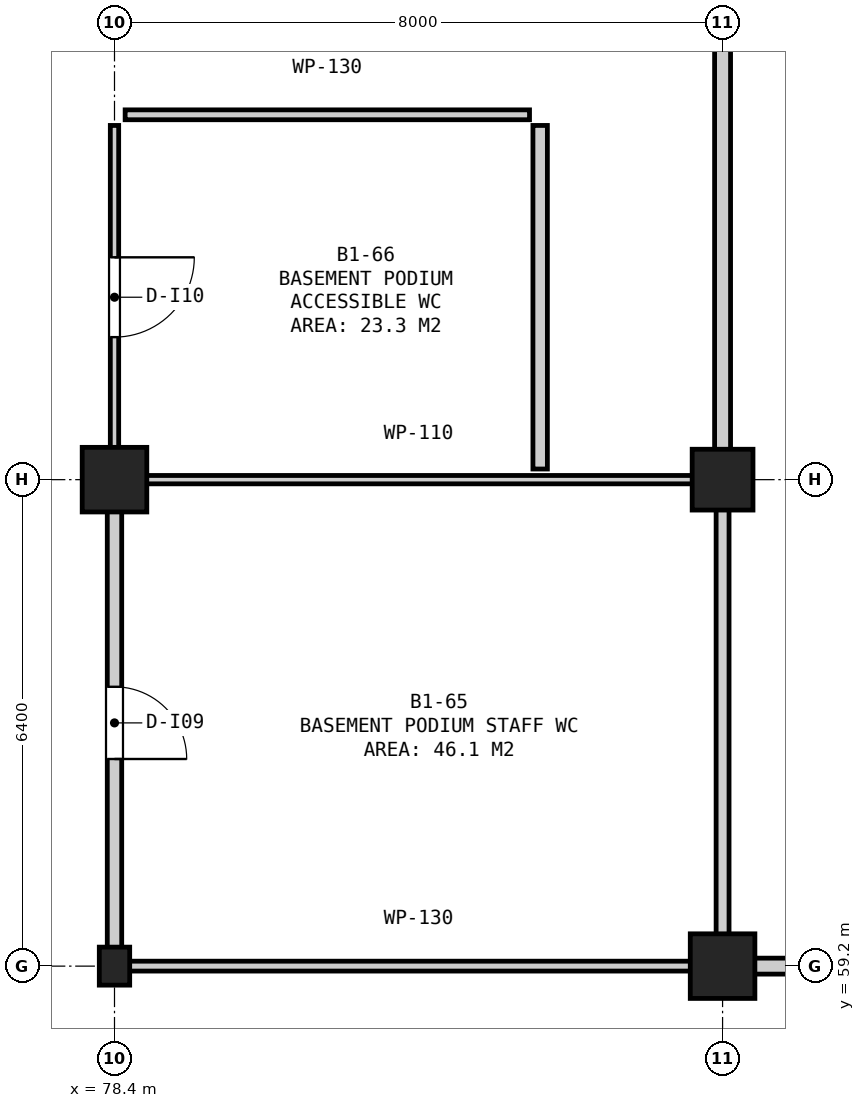
"""IFC4 building model, lengths in metres.
Left out: names, types, materials, properties, quantities, classifications, styles, units other than length and angle.
Written with IfcOpenShell. Run it as: python <this file> out.ifc"""

import sys

from ifc_helpers import new_model, si_unit, direction, frame, frame_2d, origin, origin_2d, place, context, subcontext, project, spatial, rectangle, extrude, element, fill, save


model = new_model("IFC4")
c1 = context("Model", 3, precision=1e-05, world=origin(), true_north=direction((0.0, 1.0)))
c2 = subcontext(c1, "Body", "Model", "MODEL_VIEW")
j1 = project(units=[si_unit("LENGTHUNIT", "METRE"), si_unit("PLANEANGLEUNIT", "RADIAN")], contexts=[c1])
p1 = place(None, origin())
s1 = spatial("IfcSite", under=j1, at=p1, CompositionType="ELEMENT")
p2 = place(p1, origin())
s2 = spatial("IfcBuilding", under=s1, at=p2, CompositionType="ELEMENT")
p3 = place(p2, frame((0.0, 0.0, -4.5)))
s3 = spatial("IfcBuildingStorey", under=s2, at=p3, CompositionType="ELEMENT", Elevation=-4.5)
p4 = place(p3, frame((78.4, 59.2, 0.0), z_axis=(0.0, 0.0, 1.0), x_axis=(1.0, 0.0, 0.0)))
e1 = element("IfcColumn", 1, at=p4, inside=s3, PredefinedType="COLUMN", context=c2, shape_type="SweptSolid", body=[
    extrude(rectangle(XDim=0.4, YDim=0.5, at=origin_2d()), origin(), (0.0, 0.0, 1.0), 4.5),
])
for number, where, z_axis, x_axis in (
    (2, (78.4, 65.6, 0.0), (0.0, 0.0, 1.0), (1.0, 0.0, 0.0)),
    (3, (86.4, 59.2, 0.0), (0.0, 0.0, 1.0), (1.0, 0.0, 0.0)),
):
    element("IfcColumn", number, at=place(p3, frame(where, z_axis=z_axis, x_axis=x_axis)), inside=s3, PredefinedType="COLUMN", context=c2, shape_type="SweptSolid", body=[
        extrude(rectangle(XDim=0.85, YDim=0.85, at=origin_2d()), origin(), (0.0, 0.0, 1.0), 4.5),
    ])
p5 = place(p3, frame((86.4, 65.6, 0.0), z_axis=(0.0, 0.0, 1.0), x_axis=(1.0, 0.0, 0.0)))
e4 = element("IfcColumn", 4, at=p5, inside=s3, PredefinedType="COLUMN", context=c2, shape_type="SweptSolid", body=[
    extrude(rectangle(XDim=0.8, YDim=0.8, at=origin_2d()), origin(), (0.0, 0.0, 1.0), 4.5),
])
p6 = place(p3, frame((78.54, 59.2, 0.0), z_axis=(0.0, 0.0, 1.0), x_axis=(1.0, 0.0, 0.0)))
e5 = element("IfcWall", 5, at=p6, inside=s3, PredefinedType="PARTITIONING", context=c2, shape_type="SweptSolid", body=[
    extrude(rectangle(XDim=7.72, YDim=0.13, at=frame_2d((3.86, 0.0))), origin(), (0.0, 0.0, 1.0), 3.475),
])
p7 = place(p3, frame((78.54, 65.6, 0.0), z_axis=(0.0, 0.0, 1.0), x_axis=(1.0, 0.0, 0.0)))
e6 = element("IfcWall", 6, at=p7, inside=s3, PredefinedType="PARTITIONING", context=c2, shape_type="SweptSolid", body=[
    extrude(rectangle(XDim=7.72, YDim=0.11, at=frame_2d((3.86, 0.0))), origin(), (0.0, 0.0, 1.0), 3.275),
])
p8 = place(p3, frame((78.4, 59.34, 0.0), z_axis=(0.0, 0.0, 1.0), x_axis=(0.0, 1.0, 0.0)))
e7 = element("IfcWall", 7, at=p8, inside=s3, PredefinedType="PARTITIONING", context=c2, shape_type="SweptSolid", body=[
    extrude(rectangle(XDim=6.12, YDim=0.19, at=frame_2d((3.06, 0.0))), origin(), (0.0, 0.0, 1.0), 3.375),
])
p9 = place(p8, frame((2.585, 0.0, 0.0)))
e8 = element("IfcOpeningElement", 8, at=p9, cuts=e7, PredefinedType="OPENING", context=c2, shape_type="SweptSolid", body=[
    extrude(rectangle(XDim=0.95, YDim=2.15, at=frame_2d((0.475, 1.075))), frame((0.0, 0.107, 0.0), z_axis=(0.0, -1.0, 0.0), x_axis=(1.0, 0.0, 0.0)), (0.0, 0.0, 1.0), 0.214),
])
p10 = place(p3, frame((86.4, 59.34, 0.0), z_axis=(0.0, 0.0, 1.0), x_axis=(0.0, 1.0, 0.0)))
e9 = element("IfcWall", 9, at=p10, inside=s3, PredefinedType="PARTITIONING", context=c2, shape_type="SweptSolid", body=[
    extrude(rectangle(XDim=6.12, YDim=0.17, at=frame_2d((3.06, 0.0))), origin(), (0.0, 0.0, 1.0), 3.225),
])
p11 = place(p3, frame((78.54, 70.4, 0.0), z_axis=(0.0, 0.0, 1.0), x_axis=(1.0, 0.0, 0.0)))
e10 = element("IfcWall", 10, at=p11, inside=s3, PredefinedType="PARTITIONING", context=c2, shape_type="SweptSolid", body=[
    extrude(rectangle(XDim=5.32, YDim=0.13, at=frame_2d((2.66, 0.0))), origin(), (0.0, 0.0, 1.0), 4.08),
])
p12 = place(p3, frame((78.4, 65.74, 0.0), z_axis=(0.0, 0.0, 1.0), x_axis=(0.0, 1.0, 0.0)))
e11 = element("IfcWall", 11, at=p12, inside=s3, PredefinedType="PARTITIONING", context=c2, shape_type="SweptSolid", body=[
    extrude(rectangle(XDim=4.52, YDim=0.11, at=frame_2d((2.26, 0.0))), origin(), (0.0, 0.0, 1.0), 3.425),
])
p13 = place(p12, frame((1.735, 0.0, 0.0)))
e12 = element("IfcOpeningElement", 12, at=p13, cuts=e11, PredefinedType="OPENING", context=c2, shape_type="SweptSolid", body=[
    extrude(rectangle(XDim=1.05, YDim=2.15, at=frame_2d((0.525, 1.075))), frame((0.0, 0.067, 0.0), z_axis=(0.0, -1.0, 0.0), x_axis=(1.0, 0.0, 0.0)), (0.0, 0.0, 1.0), 0.134),
])
p14 = place(p3, frame((84.0, 65.74, 0.0), z_axis=(0.0, 0.0, 1.0), x_axis=(0.0, 1.0, 0.0)))
e13 = element("IfcWall", 13, at=p14, inside=s3, PredefinedType="PARTITIONING", context=c2, shape_type="SweptSolid", body=[
    extrude(rectangle(XDim=4.52, YDim=0.19, at=frame_2d((2.26, 0.0))), origin(), (0.0, 0.0, 1.0), 4.08),
])
p15 = place(p3, frame((86.54, 59.2, 0.0), z_axis=(0.0, 0.0, 1.0), x_axis=(1.0, 0.0, 0.0)))
e14 = element("IfcWall", 14, at=p15, inside=s3, PredefinedType="SOLIDWALL", context=c2, shape_type="SweptSolid", body=[
    extrude(rectangle(XDim=23.72, YDim=0.21, at=frame_2d((11.86, 0.0))), origin(), (0.0, 0.0, 1.0), 2.925),
])
p16 = place(p15, frame((7.16, 0.0, 0.0)))
e15 = element("IfcOpeningElement", 15, at=p16, cuts=e14, PredefinedType="OPENING", context=c2, shape_type="SweptSolid", body=[
    extrude(rectangle(XDim=1.4, YDim=2.2, at=frame_2d((0.7, 1.1))), frame((0.0, 0.117, 0.0), z_axis=(0.0, -1.0, 0.0), x_axis=(1.0, 0.0, 0.0)), (0.0, 0.0, 1.0), 0.234),
])
p17 = place(p3, frame((86.4, 65.6, 0.0), z_axis=(0.0, 0.0, 1.0), x_axis=(0.0, 1.0, 0.0)))
e16 = element("IfcWall", 16, at=p17, inside=s3, PredefinedType="SOLIDWALL", context=c2, shape_type="SweptSolid", body=[
    extrude(rectangle(XDim=13.46, YDim=0.21, at=frame_2d((6.73, 0.0))), origin(), (0.0, 0.0, 1.0), 3.275),
])
p18 = place(p9, frame((0.95, 0.0, 0.0), z_axis=(0.0, 0.0, 1.0), x_axis=(-1.0, 0.0, 0.0)))
e17 = element("IfcDoor", 17, at=p18, inside=s3, OperationType="SINGLE_SWING_RIGHT", PredefinedType="DOOR", context=c2, shape_type="SweptSolid", body=[
    extrude(rectangle(XDim=0.95, YDim=2.15, at=frame_2d((0.475, 1.075))), frame((0.0, 0.025, 0.0), z_axis=(0.0, -1.0, 0.0), x_axis=(1.0, 0.0, 0.0)), (0.0, 0.0, 1.0), 0.05),
])
fill(e8, e17)
p19 = place(p13, frame((1.05, 0.0, 0.0), z_axis=(0.0, 0.0, 1.0), x_axis=(-1.0, 0.0, 0.0)))
e18 = element("IfcDoor", 18, at=p19, inside=s3, OperationType="SINGLE_SWING_LEFT", PredefinedType="DOOR", context=c2, shape_type="SweptSolid", body=[
    extrude(rectangle(XDim=1.05, YDim=2.15, at=frame_2d((0.525, 1.075))), frame((0.0, 0.025, 0.0), z_axis=(0.0, -1.0, 0.0), x_axis=(1.0, 0.0, 0.0)), (0.0, 0.0, 1.0), 0.05),
])
fill(e12, e18)
save(model, sys.argv[1])
